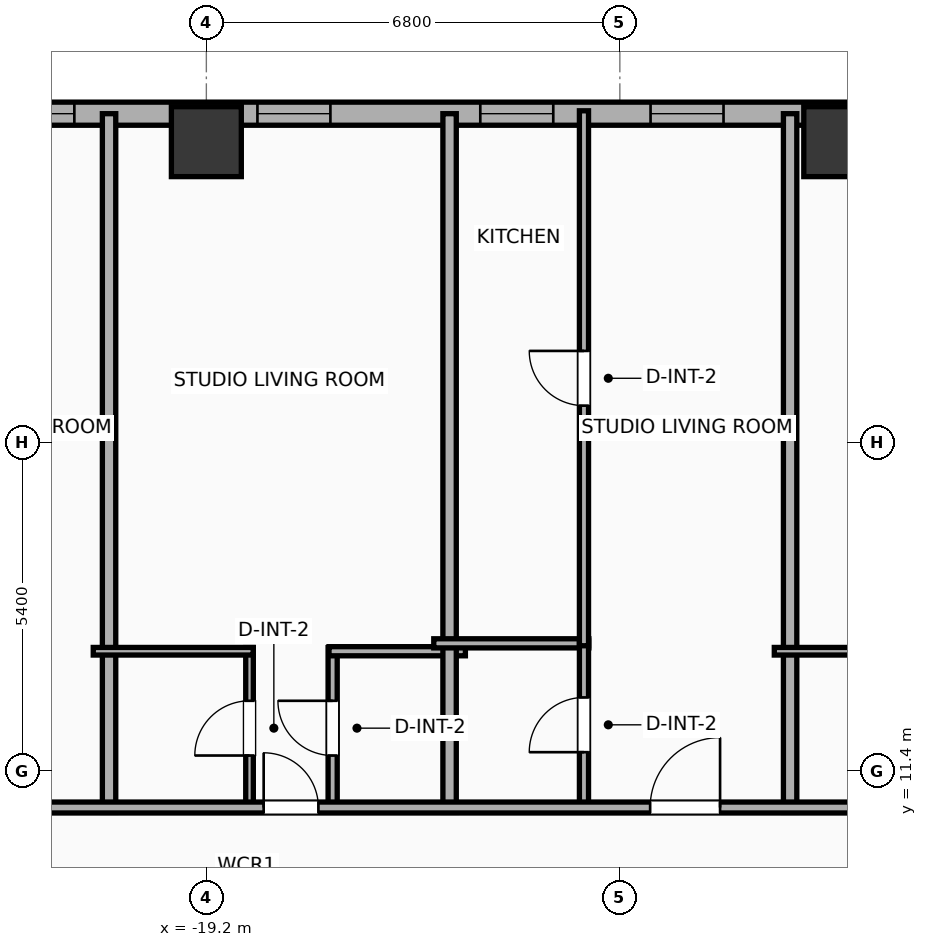
"""IFC4 building model, lengths in metres.
Left out: names, types, materials, properties, quantities, classifications, styles, units other than length and angle.
Written with IfcOpenShell. Run it as: python <this file> out.ifc"""

import sys

from ifc_helpers import new_model, si_unit, direction, frame, frame_2d, origin, origin_2d, place, context, subcontext, project, spatial, rectangle, hollow_rectangle, extrude, element, fill, save


model = new_model("IFC4")
c1 = context("Model", 3, precision=1e-05, world=origin(), true_north=direction((0.0, 1.0)))
c2 = subcontext(c1, "Body", "Model", "MODEL_VIEW")
j1 = project(units=[si_unit("LENGTHUNIT", "METRE"), si_unit("PLANEANGLEUNIT", "RADIAN")], contexts=[c1])
p1 = place(None, origin())
s1 = spatial("IfcSite", under=j1, at=p1, CompositionType="ELEMENT")
p2 = place(p1, origin())
s2 = spatial("IfcBuilding", under=s1, at=p2, CompositionType="ELEMENT")
p3 = place(p2, frame((0.0, 0.0, 29.9)))
s3 = spatial("IfcBuildingStorey", under=s2, at=p3, CompositionType="ELEMENT", Elevation=29.9)
for number, where, z_axis, x_axis in (
    (1, (-8.8, 21.75, 0.0), (0.0, 0.0, 1.0), (1.0, 0.0, 0.0)),
    (2, (-19.2, 21.75, 0.0), (0.0, 0.0, 1.0), (1.0, 0.0, 0.0)),
):
    element("IfcColumn", number, at=place(p3, frame(where, z_axis=z_axis, x_axis=x_axis)), inside=s3, PredefinedType="COLUMN", context=c2, shape_type="SweptSolid", body=[
        extrude(hollow_rectangle(XDim=1.15, YDim=1.15, WallThickness=0.04, at=origin_2d()), origin(), (0.0, 0.0, 1.0), 3.9),
    ])
p4 = place(p3, frame((-29.581, 22.21, 0.0), z_axis=(0.0, 0.0, 1.0), x_axis=(1.0, 0.0, 0.0)))
e3 = element("IfcWall", 3, at=p4, inside=s3, PredefinedType="ELEMENTEDWALL", context=c2, shape_type="SweptSolid", body=[
    extrude(rectangle(XDim=51.963, YDim=0.38, at=frame_2d((25.981, 0.0))), origin(), (0.0, 0.0, 1.0), 2.54),
])
p5 = place(p4, frame((5.81, 0.0, 0.75)))
e4 = element("IfcOpeningElement", 4, at=p5, cuts=e3, PredefinedType="OPENING", context=c2, shape_type="SweptSolid", body=[
    extrude(rectangle(XDim=2.4, YDim=1.63, at=frame_2d((1.2, 0.815))), frame((0.0, 0.2, 0.0), z_axis=(0.0, -1.0, 0.0), x_axis=(1.0, 0.0, 0.0)), (0.0, 0.0, 1.0), 0.4),
])
p6 = place(p4, frame((42.952, 0.0, 0.75)))
e5 = element("IfcOpeningElement", 5, at=p6, cuts=e3, PredefinedType="OPENING", context=c2, shape_type="SweptSolid", body=[
    extrude(rectangle(XDim=2.4, YDim=1.63, at=frame_2d((1.2, 0.815))), frame((0.0, 0.2, 0.0), z_axis=(0.0, -1.0, 0.0), x_axis=(1.0, 0.0, 0.0)), (0.0, 0.0, 1.0), 0.4),
])
p7 = place(p4, frame((1.436, 0.0, 0.75)))
e6 = element("IfcOpeningElement", 6, at=p7, cuts=e3, PredefinedType="OPENING", context=c2, shape_type="SweptSolid", body=[
    extrude(rectangle(XDim=1.2, YDim=1.63, at=frame_2d((0.6, 0.815))), frame((0.0, 0.2, 0.0), z_axis=(0.0, -1.0, 0.0), x_axis=(1.0, 0.0, 0.0)), (0.0, 0.0, 1.0), 0.4),
])
p8 = place(p4, frame((3.686, 0.0, 0.75)))
e7 = element("IfcOpeningElement", 7, at=p8, cuts=e3, PredefinedType="OPENING", context=c2, shape_type="SweptSolid", body=[
    extrude(rectangle(XDim=1.2, YDim=1.63, at=frame_2d((0.6, 0.815))), frame((0.0, 0.2, 0.0), z_axis=(0.0, -1.0, 0.0), x_axis=(1.0, 0.0, 0.0)), (0.0, 0.0, 1.0), 0.4),
])
p9 = place(p4, frame((11.221, 0.0, 0.75)))
e8 = element("IfcOpeningElement", 8, at=p9, cuts=e3, PredefinedType="OPENING", context=c2, shape_type="SweptSolid", body=[
    extrude(rectangle(XDim=1.2, YDim=1.63, at=frame_2d((0.6, 0.815))), frame((0.0, 0.2, 0.0), z_axis=(0.0, -1.0, 0.0), x_axis=(1.0, 0.0, 0.0)), (0.0, 0.0, 1.0), 0.4),
])
p10 = place(p4, frame((17.686, 0.0, 0.75)))
e9 = element("IfcOpeningElement", 9, at=p10, cuts=e3, PredefinedType="OPENING", context=c2, shape_type="SweptSolid", body=[
    extrude(rectangle(XDim=1.2, YDim=1.63, at=frame_2d((0.6, 0.815))), frame((0.0, 0.2, 0.0), z_axis=(0.0, -1.0, 0.0), x_axis=(1.0, 0.0, 0.0)), (0.0, 0.0, 1.0), 0.4),
])
p11 = place(p4, frame((14.886, 0.0, 0.75)))
e10 = element("IfcOpeningElement", 10, at=p11, cuts=e3, PredefinedType="OPENING", context=c2, shape_type="SweptSolid", body=[
    extrude(rectangle(XDim=1.2, YDim=1.63, at=frame_2d((0.6, 0.815))), frame((0.0, 0.2, 0.0), z_axis=(0.0, -1.0, 0.0), x_axis=(1.0, 0.0, 0.0)), (0.0, 0.0, 1.0), 0.4),
])
p12 = place(p4, frame((22.181, 0.0, 0.75)))
e11 = element("IfcOpeningElement", 11, at=p12, cuts=e3, PredefinedType="OPENING", context=c2, shape_type="SweptSolid", body=[
    extrude(rectangle(XDim=1.2, YDim=1.63, at=frame_2d((0.6, 0.815))), frame((0.0, 0.2, 0.0), z_axis=(0.0, -1.0, 0.0), x_axis=(1.0, 0.0, 0.0)), (0.0, 0.0, 1.0), 0.4),
])
p13 = place(p4, frame((28.926, 0.0, 0.75)))
e12 = element("IfcOpeningElement", 12, at=p13, cuts=e3, PredefinedType="OPENING", context=c2, shape_type="SweptSolid", body=[
    extrude(rectangle(XDim=1.2, YDim=1.63, at=frame_2d((0.6, 0.815))), frame((0.0, 0.2, 0.0), z_axis=(0.0, -1.0, 0.0), x_axis=(1.0, 0.0, 0.0)), (0.0, 0.0, 1.0), 0.4),
])
p14 = place(p4, frame((26.126, 0.0, 0.75)))
e13 = element("IfcOpeningElement", 13, at=p14, cuts=e3, PredefinedType="OPENING", context=c2, shape_type="SweptSolid", body=[
    extrude(rectangle(XDim=1.2, YDim=1.63, at=frame_2d((0.6, 0.815))), frame((0.0, 0.2, 0.0), z_axis=(0.0, -1.0, 0.0), x_axis=(1.0, 0.0, 0.0)), (0.0, 0.0, 1.0), 0.4),
])
p15 = place(p4, frame((32.276, 0.0, 0.75)))
e14 = element("IfcOpeningElement", 14, at=p15, cuts=e3, PredefinedType="OPENING", context=c2, shape_type="SweptSolid", body=[
    extrude(rectangle(XDim=1.2, YDim=1.63, at=frame_2d((0.6, 0.815))), frame((0.0, 0.2, 0.0), z_axis=(0.0, -1.0, 0.0), x_axis=(1.0, 0.0, 0.0)), (0.0, 0.0, 1.0), 0.4),
])
p16 = place(p4, frame((35.076, 0.0, 0.75)))
e15 = element("IfcOpeningElement", 15, at=p16, cuts=e3, PredefinedType="OPENING", context=c2, shape_type="SweptSolid", body=[
    extrude(rectangle(XDim=1.2, YDim=1.63, at=frame_2d((0.6, 0.815))), frame((0.0, 0.2, 0.0), z_axis=(0.0, -1.0, 0.0), x_axis=(1.0, 0.0, 0.0)), (0.0, 0.0, 1.0), 0.4),
])
p17 = place(p4, frame((38.981, 0.0, 0.75)))
e16 = element("IfcOpeningElement", 16, at=p17, cuts=e3, PredefinedType="OPENING", context=c2, shape_type="SweptSolid", body=[
    extrude(rectangle(XDim=1.2, YDim=1.63, at=frame_2d((0.6, 0.815))), frame((0.0, 0.2, 0.0), z_axis=(0.0, -1.0, 0.0), x_axis=(1.0, 0.0, 0.0)), (0.0, 0.0, 1.0), 0.4),
])
p18 = place(p4, frame((46.276, 0.0, 0.75)))
e17 = element("IfcOpeningElement", 17, at=p18, cuts=e3, PredefinedType="OPENING", context=c2, shape_type="SweptSolid", body=[
    extrude(rectangle(XDim=1.2, YDim=1.63, at=frame_2d((0.6, 0.815))), frame((0.0, 0.2, 0.0), z_axis=(0.0, -1.0, 0.0), x_axis=(1.0, 0.0, 0.0)), (0.0, 0.0, 1.0), 0.4),
])
p19 = place(p4, frame((48.927, 0.0, 0.75)))
e18 = element("IfcOpeningElement", 18, at=p19, cuts=e3, PredefinedType="OPENING", context=c2, shape_type="SweptSolid", body=[
    extrude(rectangle(XDim=1.2, YDim=1.63, at=frame_2d((0.6, 0.815))), frame((0.0, 0.2, 0.0), z_axis=(0.0, -1.0, 0.0), x_axis=(1.0, 0.0, 0.0)), (0.0, 0.0, 1.0), 0.4),
])
p20 = place(p3, frame((-20.8, 10.72, 0.0), z_axis=(0.0, 0.0, 1.0), x_axis=(0.0, 1.0, 0.0)))
e19 = element("IfcWall", 19, at=p20, inside=s3, PredefinedType="PARTITIONING", context=c2, shape_type="SweptSolid", body=[
    extrude(rectangle(XDim=11.49, YDim=0.22, at=frame_2d((5.745, 0.0))), origin(), (0.0, 0.0, 1.0), 3.65),
])
p21 = place(p3, frame((-18.49, 10.78, 0.0), z_axis=(0.0, 0.0, 1.0), x_axis=(0.0, 1.0, 0.0)))
e20 = element("IfcWall", 20, at=p21, inside=s3, PredefinedType="PARTITIONING", context=c2, shape_type="SweptSolid", body=[
    extrude(rectangle(XDim=2.65, YDim=0.125, at=frame_2d((1.325, 0.0))), origin(), (0.0, 0.0, 1.0), 3.65),
])
p22 = place(p21, frame((0.875, 0.0, 0.0)))
e21 = element("IfcOpeningElement", 21, at=p22, cuts=e20, PredefinedType="OPENING", context=c2, shape_type="SweptSolid", body=[
    extrude(rectangle(XDim=0.9, YDim=2.05, at=frame_2d((0.45, 1.025))), frame((0.0, 0.073, 0.0), z_axis=(0.0, -1.0, 0.0), x_axis=(1.0, 0.0, 0.0)), (0.0, 0.0, 1.0), 0.145),
])
p23 = place(p3, frame((-17.123, 10.78, 0.0), z_axis=(0.0, 0.0, 1.0), x_axis=(0.0, 1.0, 0.0)))
e22 = element("IfcWall", 22, at=p23, inside=s3, PredefinedType="PLUMBINGWALL", context=c2, shape_type="SweptSolid", body=[
    extrude(rectangle(XDim=2.65, YDim=0.15, at=frame_2d((1.325, 0.0))), origin(), (0.0, 0.0, 1.0), 3.65),
])
p24 = place(p23, frame((0.875, 0.0, 0.0)))
e23 = element("IfcOpeningElement", 23, at=p24, cuts=e22, PredefinedType="OPENING", context=c2, shape_type="SweptSolid", body=[
    extrude(rectangle(XDim=0.9, YDim=2.05, at=frame_2d((0.45, 1.025))), frame((0.0, 0.085, 0.0), z_axis=(0.0, -1.0, 0.0), x_axis=(1.0, 0.0, 0.0)), (0.0, 0.0, 1.0), 0.17),
])
p25 = place(p3, frame((-21.06, 13.37, 0.0), z_axis=(0.0, 0.0, 1.0), x_axis=(1.0, 0.0, 0.0)))
e24 = element("IfcWall", 24, at=p25, inside=s3, PredefinedType="PARTITIONING", context=c2, shape_type="SweptSolid", body=[
    extrude(rectangle(XDim=2.63, YDim=0.125, at=frame_2d((1.315, 0.0))), origin(), (0.0, 0.0, 1.0), 3.65),
])
p26 = place(p3, frame((-17.183, 13.37, 0.0), z_axis=(0.0, 0.0, 1.0), x_axis=(1.0, 0.0, 0.0)))
e25 = element("IfcWall", 25, at=p26, inside=s3, PredefinedType="PLUMBINGWALL", context=c2, shape_type="SweptSolid", body=[
    extrude(rectangle(XDim=2.243, YDim=0.15, at=frame_2d((1.122, 0.0))), origin(), (0.0, 0.0, 1.0), 3.65),
])
p27 = place(p3, frame((-15.2, 10.72, 0.0), z_axis=(0.0, 0.0, 1.0), x_axis=(0.0, 1.0, 0.0)))
e26 = element("IfcWall", 26, at=p27, inside=s3, PredefinedType="PARTITIONING", context=c2, shape_type="SweptSolid", body=[
    extrude(rectangle(XDim=11.49, YDim=0.22, at=frame_2d((5.745, 0.0))), origin(), (0.0, 0.0, 1.0), 3.65),
])
p28 = place(p3, frame((-15.46, 13.5, 0.0), z_axis=(0.0, 0.0, 1.0), x_axis=(1.0, 0.0, 0.0)))
e27 = element("IfcWall", 27, at=p28, inside=s3, PredefinedType="PLUMBINGWALL", context=c2, shape_type="SweptSolid", body=[
    extrude(rectangle(XDim=2.55, YDim=0.15, at=frame_2d((1.275, 0.0))), origin(), (0.0, 0.0, 1.0), 3.65),
])
p29 = place(p3, frame((-12.99, 10.78, 0.0), z_axis=(0.0, 0.0, 1.0), x_axis=(0.0, 1.0, 0.0)))
e28 = element("IfcWall", 28, at=p29, inside=s3, PredefinedType="PLUMBINGWALL", context=c2, shape_type="SweptSolid", body=[
    extrude(rectangle(XDim=2.76, YDim=0.15, at=frame_2d((1.38, 0.0))), origin(), (0.0, 0.0, 1.0), 3.65),
])
p30 = place(p29, frame((0.93, 0.0, 0.0)))
e29 = element("IfcOpeningElement", 29, at=p30, cuts=e28, PredefinedType="OPENING", context=c2, shape_type="SweptSolid", body=[
    extrude(rectangle(XDim=0.9, YDim=2.05, at=frame_2d((0.45, 1.025))), frame((0.0, 0.085, 0.0), z_axis=(0.0, -1.0, 0.0), x_axis=(1.0, 0.0, 0.0)), (0.0, 0.0, 1.0), 0.17),
])
p31 = place(p3, frame((-12.99, 13.46, 0.0), z_axis=(0.0, 0.0, 1.0), x_axis=(0.0, 1.0, 0.0)))
e30 = element("IfcWall", 30, at=p31, inside=s3, PredefinedType="PLUMBINGWALL", context=c2, shape_type="SweptSolid", body=[
    extrude(rectangle(XDim=8.798, YDim=0.15, at=frame_2d((4.399, 0.0))), origin(), (0.0, 0.0, 1.0), 3.65),
])
p32 = place(p31, frame((3.949, 0.0, 0.0)))
e31 = element("IfcOpeningElement", 31, at=p32, cuts=e30, PredefinedType="OPENING", context=c2, shape_type="SweptSolid", body=[
    extrude(rectangle(XDim=0.9, YDim=2.05, at=frame_2d((0.45, 1.025))), frame((0.0, 0.085, 0.0), z_axis=(0.0, -1.0, 0.0), x_axis=(1.0, 0.0, 0.0)), (0.0, 0.0, 1.0), 0.17),
])
p33 = place(p3, frame((-9.6, 10.72, 0.0), z_axis=(0.0, 0.0, 1.0), x_axis=(0.0, 1.0, 0.0)))
e32 = element("IfcWall", 32, at=p33, inside=s3, PredefinedType="PARTITIONING", context=c2, shape_type="SweptSolid", body=[
    extrude(rectangle(XDim=11.49, YDim=0.22, at=frame_2d((5.745, 0.0))), origin(), (0.0, 0.0, 1.0), 2.54),
])
p34 = place(p3, frame((-9.86, 13.37, 0.0), z_axis=(0.0, 0.0, 1.0), x_axis=(1.0, 0.0, 0.0)))
e33 = element("IfcWall", 33, at=p34, inside=s3, PredefinedType="PARTITIONING", context=c2, shape_type="SweptSolid", body=[
    extrude(rectangle(XDim=2.63, YDim=0.125, at=frame_2d((1.315, 0.0))), origin(), (0.0, 0.0, 1.0), 3.65),
])
p35 = place(p3, frame((-33.41, 10.8, 0.0), z_axis=(0.0, 0.0, 1.0), x_axis=(1.0, 0.0, 0.0)))
e34 = element("IfcWall", 34, at=p35, inside=s3, PredefinedType="PARTITIONING", context=c2, shape_type="SweptSolid", body=[
    extrude(rectangle(XDim=59.62, YDim=0.18, at=frame_2d((29.81, 0.0))), origin(), (0.0, 0.0, 1.0), 3.65),
])
p36 = place(p35, frame((3.062, 0.0, 0.0)))
e35 = element("IfcOpeningElement", 35, at=p36, cuts=e34, PredefinedType="OPENING", context=c2, shape_type="SweptSolid", body=[
    extrude(rectangle(XDim=1.15, YDim=2.05, at=frame_2d((0.575, 1.025))), frame((0.0, 0.1, 0.0), z_axis=(0.0, -1.0, 0.0), x_axis=(1.0, 0.0, 0.0)), (0.0, 0.0, 1.0), 0.2),
])
p37 = place(p35, frame((10.312, 0.0, 0.0)))
e36 = element("IfcOpeningElement", 36, at=p37, cuts=e34, PredefinedType="OPENING", context=c2, shape_type="SweptSolid", body=[
    extrude(rectangle(XDim=1.15, YDim=2.05, at=frame_2d((0.575, 1.025))), frame((0.0, 0.1, 0.0), z_axis=(0.0, -1.0, 0.0), x_axis=(1.0, 0.0, 0.0)), (0.0, 0.0, 1.0), 0.2),
])
p38 = place(p35, frame((15.153, 0.0, 0.0)))
e37 = element("IfcOpeningElement", 37, at=p38, cuts=e34, PredefinedType="OPENING", context=c2, shape_type="SweptSolid", body=[
    extrude(rectangle(XDim=0.9, YDim=2.05, at=frame_2d((0.45, 1.025))), frame((0.0, 0.1, 0.0), z_axis=(0.0, -1.0, 0.0), x_axis=(1.0, 0.0, 0.0)), (0.0, 0.0, 1.0), 0.2),
])
p39 = place(p35, frame((21.508, 0.0, 0.0)))
e38 = element("IfcOpeningElement", 38, at=p39, cuts=e34, PredefinedType="OPENING", context=c2, shape_type="SweptSolid", body=[
    extrude(rectangle(XDim=1.15, YDim=2.05, at=frame_2d((0.575, 1.025))), frame((0.0, 0.1, 0.0), z_axis=(0.0, -1.0, 0.0), x_axis=(1.0, 0.0, 0.0)), (0.0, 0.0, 1.0), 0.2),
])
p40 = place(p35, frame((26.355, 0.0, 0.0)))
e39 = element("IfcOpeningElement", 39, at=p40, cuts=e34, PredefinedType="OPENING", context=c2, shape_type="SweptSolid", body=[
    extrude(rectangle(XDim=0.9, YDim=2.05, at=frame_2d((0.45, 1.025))), frame((0.0, 0.1, 0.0), z_axis=(0.0, -1.0, 0.0), x_axis=(1.0, 0.0, 0.0)), (0.0, 0.0, 1.0), 0.2),
])
p41 = place(p35, frame((32.753, 0.0, 0.0)))
e40 = element("IfcOpeningElement", 40, at=p41, cuts=e34, PredefinedType="OPENING", context=c2, shape_type="SweptSolid", body=[
    extrude(rectangle(XDim=1.15, YDim=2.05, at=frame_2d((0.575, 1.025))), frame((0.0, 0.1, 0.0), z_axis=(0.0, -1.0, 0.0), x_axis=(1.0, 0.0, 0.0)), (0.0, 0.0, 1.0), 0.2),
])
p42 = place(p35, frame((36.163, 0.0, 0.0)))
e41 = element("IfcOpeningElement", 41, at=p42, cuts=e34, PredefinedType="OPENING", context=c2, shape_type="SweptSolid", body=[
    extrude(rectangle(XDim=1.15, YDim=2.05, at=frame_2d((0.575, 1.025))), frame((0.0, 0.1, 0.0), z_axis=(0.0, -1.0, 0.0), x_axis=(1.0, 0.0, 0.0)), (0.0, 0.0, 1.0), 0.2),
])
p43 = place(p35, frame((43.156, 0.0, 0.0)))
e42 = element("IfcOpeningElement", 42, at=p43, cuts=e34, PredefinedType="OPENING", context=c2, shape_type="SweptSolid", body=[
    extrude(rectangle(XDim=0.9, YDim=2.05, at=frame_2d((0.45, 1.025))), frame((0.0, 0.1, 0.0), z_axis=(0.0, -1.0, 0.0), x_axis=(1.0, 0.0, 0.0)), (0.0, 0.0, 1.0), 0.2),
])
p44 = place(p35, frame((47.36, 0.0, 0.0)))
e43 = element("IfcOpeningElement", 43, at=p44, cuts=e34, PredefinedType="OPENING", context=c2, shape_type="SweptSolid", body=[
    extrude(rectangle(XDim=1.15, YDim=2.05, at=frame_2d((0.575, 1.025))), frame((0.0, 0.1, 0.0), z_axis=(0.0, -1.0, 0.0), x_axis=(1.0, 0.0, 0.0)), (0.0, 0.0, 1.0), 0.2),
])
p45 = place(p35, frame((55.337, 0.0, 0.0)))
e44 = element("IfcOpeningElement", 44, at=p45, cuts=e34, PredefinedType="OPENING", context=c2, shape_type="SweptSolid", body=[
    extrude(rectangle(XDim=1.15, YDim=2.05, at=frame_2d((0.575, 1.025))), frame((0.0, 0.1, 0.0), z_axis=(0.0, -1.0, 0.0), x_axis=(1.0, 0.0, 0.0)), (0.0, 0.0, 1.0), 0.2),
])
p46 = place(p5, origin())
e45 = element("IfcWindow", 45, at=p46, inside=s3, PartitioningType="SINGLE_PANEL", PredefinedType="WINDOW", context=c2, shape_type="SweptSolid", body=[
    extrude(rectangle(XDim=2.4, YDim=1.63, at=frame_2d((1.2, 0.815))), frame((0.0, 0.03, 0.0), z_axis=(0.0, -1.0, 0.0), x_axis=(1.0, 0.0, 0.0)), (0.0, 0.0, 1.0), 0.06),
])
fill(e4, e45)
p47 = place(p9, origin())
e46 = element("IfcWindow", 46, at=p47, inside=s3, PartitioningType="SINGLE_PANEL", PredefinedType="WINDOW", context=c2, shape_type="SweptSolid", body=[
    extrude(rectangle(XDim=1.2, YDim=1.63, at=frame_2d((0.6, 0.815))), frame((0.0, 0.03, 0.0), z_axis=(0.0, -1.0, 0.0), x_axis=(1.0, 0.0, 0.0)), (0.0, 0.0, 1.0), 0.06),
])
fill(e8, e46)
p48 = place(p10, origin())
e47 = element("IfcWindow", 47, at=p48, inside=s3, PartitioningType="SINGLE_PANEL", PredefinedType="WINDOW", context=c2, shape_type="SweptSolid", body=[
    extrude(rectangle(XDim=1.2, YDim=1.63, at=frame_2d((0.6, 0.815))), frame((0.0, 0.03, 0.0), z_axis=(0.0, -1.0, 0.0), x_axis=(1.0, 0.0, 0.0)), (0.0, 0.0, 1.0), 0.06),
])
fill(e9, e47)
p49 = place(p11, origin())
e48 = element("IfcWindow", 48, at=p49, inside=s3, PartitioningType="SINGLE_PANEL", PredefinedType="WINDOW", context=c2, shape_type="SweptSolid", body=[
    extrude(rectangle(XDim=1.2, YDim=1.63, at=frame_2d((0.6, 0.815))), frame((0.0, 0.03, 0.0), z_axis=(0.0, -1.0, 0.0), x_axis=(1.0, 0.0, 0.0)), (0.0, 0.0, 1.0), 0.06),
])
fill(e10, e48)
p50 = place(p22, origin())
e49 = element("IfcDoor", 49, at=p50, inside=s3, OperationType="SINGLE_SWING_LEFT", PredefinedType="DOOR", context=c2, shape_type="SweptSolid", body=[
    extrude(rectangle(XDim=0.9, YDim=2.05, at=frame_2d((0.45, 1.025))), frame((0.0, 0.025, 0.0), z_axis=(0.0, -1.0, 0.0), x_axis=(1.0, 0.0, 0.0)), (0.0, 0.0, 1.0), 0.05),
])
fill(e21, e49)
p51 = place(p24, origin())
e50 = element("IfcDoor", 50, at=p51, inside=s3, OperationType="SINGLE_SWING_RIGHT", PredefinedType="DOOR", context=c2, shape_type="SweptSolid", body=[
    extrude(rectangle(XDim=0.9, YDim=2.05, at=frame_2d((0.45, 1.025))), frame((0.0, 0.025, 0.0), z_axis=(0.0, -1.0, 0.0), x_axis=(1.0, 0.0, 0.0)), (0.0, 0.0, 1.0), 0.05),
])
fill(e23, e50)
p52 = place(p30, origin())
e51 = element("IfcDoor", 51, at=p52, inside=s3, OperationType="SINGLE_SWING_LEFT", PredefinedType="DOOR", context=c2, shape_type="SweptSolid", body=[
    extrude(rectangle(XDim=0.9, YDim=2.05, at=frame_2d((0.45, 1.025))), frame((0.0, 0.025, 0.0), z_axis=(0.0, -1.0, 0.0), x_axis=(1.0, 0.0, 0.0)), (0.0, 0.0, 1.0), 0.05),
])
fill(e29, e51)
p53 = place(p32, origin())
e52 = element("IfcDoor", 52, at=p53, inside=s3, OperationType="SINGLE_SWING_RIGHT", PredefinedType="DOOR", context=c2, shape_type="SweptSolid", body=[
    extrude(rectangle(XDim=0.9, YDim=2.05, at=frame_2d((0.45, 1.025))), frame((0.0, 0.025, 0.0), z_axis=(0.0, -1.0, 0.0), x_axis=(1.0, 0.0, 0.0)), (0.0, 0.0, 1.0), 0.05),
])
fill(e31, e52)
p54 = place(p38, origin())
e53 = element("IfcDoor", 53, at=p54, inside=s3, OperationType="SINGLE_SWING_LEFT", PredefinedType="DOOR", context=c2, shape_type="SweptSolid", body=[
    extrude(rectangle(XDim=0.9, YDim=2.05, at=frame_2d((0.45, 1.025))), frame((0.0, 0.025, 0.0), z_axis=(0.0, -1.0, 0.0), x_axis=(1.0, 0.0, 0.0)), (0.0, 0.0, 1.0), 0.05),
])
fill(e37, e53)
p55 = place(p39, origin())
e54 = element("IfcDoor", 54, at=p55, inside=s3, OperationType="SINGLE_SWING_RIGHT", PredefinedType="DOOR", context=c2, shape_type="SweptSolid", body=[
    extrude(rectangle(XDim=1.15, YDim=2.05, at=frame_2d((0.575, 1.025))), frame((0.0, 0.025, 0.0), z_axis=(0.0, -1.0, 0.0), x_axis=(1.0, 0.0, 0.0)), (0.0, 0.0, 1.0), 0.05),
])
fill(e38, e54)
save(model, sys.argv[1])
